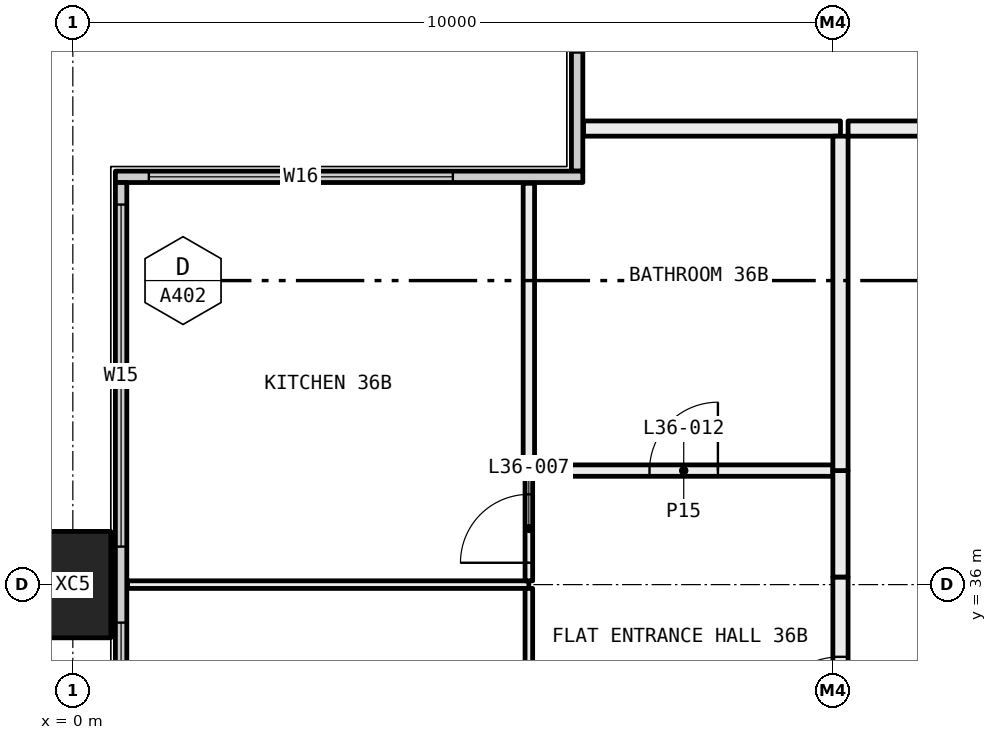
"""IFC4 building model, lengths in metres.
Left out: names, types, materials, properties, quantities, classifications, styles, units other than length and angle.
Written with IfcOpenShell. Run it as: python <this file> out.ifc"""

import sys

from ifc_helpers import new_model, si_unit, direction, frame, frame_2d, origin, origin_2d, place, context, subcontext, project, spatial, rectangle, hollow_rectangle, extrude, element, fill, save


model = new_model("IFC4")
c1 = context("Model", 3, precision=1e-05, world=origin(), true_north=direction((0.0, 1.0)))
c2 = subcontext(c1, "Body", "Model", "MODEL_VIEW")
j1 = project(units=[si_unit("LENGTHUNIT", "METRE"), si_unit("PLANEANGLEUNIT", "RADIAN")], contexts=[c1])
p1 = place(None, origin())
s1 = spatial("IfcSite", under=j1, at=p1, CompositionType="ELEMENT")
p2 = place(p1, origin())
s2 = spatial("IfcBuilding", under=s1, at=p2, CompositionType="ELEMENT")
p3 = place(p2, frame((0.0, 0.0, 138.0)))
s3 = spatial("IfcBuildingStorey", under=s2, at=p3, CompositionType="ELEMENT", Elevation=138.0)
p4 = place(p3, frame((0.0, 36.0, -0.4), z_axis=(0.0, 0.0, 1.0), x_axis=(0.0, 1.0, 0.0)))
e1 = element("IfcColumn", 1, at=p4, inside=s3, PredefinedType="COLUMN", context=c2, shape_type="SweptSolid", body=[
    extrude(hollow_rectangle(XDim=1.4, YDim=1.0, WallThickness=0.055, at=origin_2d()), origin(), (0.0, 0.0, 1.0), 3.45),
])
p5 = place(p3, frame((6.635, 41.44, 0.0), z_axis=(0.0, 0.0, 1.0), x_axis=(0.0, 1.0, 0.0)))
e2 = element("IfcWall", 2, at=p5, inside=s3, PredefinedType="ELEMENTEDWALL", context=c2, shape_type="SweptSolid", body=[
    extrude(rectangle(XDim=5.85, YDim=0.15, at=frame_2d((2.925, 0.0))), origin(), (0.0, 0.0, 1.0), 3.05),
])
p6 = place(p5, frame((1.56, 0.0, 0.45)))
e3 = element("IfcOpeningElement", 3, at=p6, cuts=e2, PredefinedType="OPENING", context=c2, shape_type="SweptSolid", body=[
    extrude(rectangle(XDim=4.0, YDim=2.55, at=frame_2d((2.0, 1.275))), frame((0.0, 0.085, 0.0), z_axis=(0.0, -1.0, 0.0), x_axis=(1.0, 0.0, 0.0)), (0.0, 0.0, 1.0), 0.17),
])
p7 = place(p3, frame((0.56, 41.365, 0.0), z_axis=(0.0, 0.0, 1.0), x_axis=(1.0, 0.0, 0.0)))
e4 = element("IfcWall", 4, at=p7, inside=s3, PredefinedType="ELEMENTEDWALL", context=c2, shape_type="SweptSolid", body=[
    extrude(rectangle(XDim=6.15, YDim=0.15, at=frame_2d((3.075, 0.0))), origin(), (0.0, 0.0, 1.0), 3.05),
])
p8 = place(p7, frame((0.44, 0.0, 0.45)))
e5 = element("IfcOpeningElement", 5, at=p8, cuts=e4, PredefinedType="OPENING", context=c2, shape_type="SweptSolid", body=[
    extrude(rectangle(XDim=4.0, YDim=2.55, at=frame_2d((2.0, 1.275))), frame((0.0, 0.085, 0.0), z_axis=(0.0, -1.0, 0.0), x_axis=(1.0, 0.0, 0.0)), (0.0, 0.0, 1.0), 0.17),
])
p9 = place(p3, frame((0.635, 18.71, 0.0), z_axis=(0.0, 0.0, 1.0), x_axis=(0.0, 1.0, 0.0)))
e6 = element("IfcWall", 6, at=p9, inside=s3, PredefinedType="ELEMENTEDWALL", context=c2, shape_type="SweptSolid", body=[
    extrude(rectangle(XDim=22.58, YDim=0.15, at=frame_2d((11.29, 0.0))), origin(), (0.0, 0.0, 1.0), 3.05),
])
p10 = place(p9, frame((0.29, 0.0, 0.45)))
e7 = element("IfcOpeningElement", 7, at=p10, cuts=e6, PredefinedType="OPENING", context=c2, shape_type="SweptSolid", body=[
    extrude(rectangle(XDim=4.5, YDim=2.55, at=frame_2d((2.25, 1.275))), frame((0.0, 0.085, 0.0), z_axis=(0.0, -1.0, 0.0), x_axis=(1.0, 0.0, 0.0)), (0.0, 0.0, 1.0), 0.17),
])
p11 = place(p9, frame((5.79, 0.0, 0.45)))
e8 = element("IfcOpeningElement", 8, at=p11, cuts=e6, PredefinedType="OPENING", context=c2, shape_type="SweptSolid", body=[
    extrude(rectangle(XDim=3.0, YDim=2.55, at=frame_2d((1.5, 1.275))), frame((0.0, 0.085, 0.0), z_axis=(0.0, -1.0, 0.0), x_axis=(1.0, 0.0, 0.0)), (0.0, 0.0, 1.0), 0.17),
])
p12 = place(p9, frame((14.79, 0.0, 0.45)))
e9 = element("IfcOpeningElement", 9, at=p12, cuts=e6, PredefinedType="OPENING", context=c2, shape_type="SweptSolid", body=[
    extrude(rectangle(XDim=2.0, YDim=2.55, at=frame_2d((1.0, 1.275))), frame((0.0, 0.085, 0.0), z_axis=(0.0, -1.0, 0.0), x_axis=(1.0, 0.0, 0.0)), (0.0, 0.0, 1.0), 0.17),
])
p13 = place(p9, frame((17.79, 0.0, 0.45)))
e10 = element("IfcOpeningElement", 10, at=p13, cuts=e6, PredefinedType="OPENING", context=c2, shape_type="SweptSolid", body=[
    extrude(rectangle(XDim=4.5, YDim=2.55, at=frame_2d((2.25, 1.275))), frame((0.0, 0.085, 0.0), z_axis=(0.0, -1.0, 0.0), x_axis=(1.0, 0.0, 0.0)), (0.0, 0.0, 1.0), 0.17),
])
p14 = place(p3, frame((6.0, 36.0, 0.0), z_axis=(0.0, 0.0, 1.0), x_axis=(-1.0, 0.0, 0.0)))
e11 = element("IfcWall", 11, at=p14, inside=s3, PredefinedType="PARTITIONING", context=c2, shape_type="SweptSolid", body=[
    extrude(rectangle(XDim=5.28, YDim=0.1, at=frame_2d((2.64, 0.0))), origin(), (0.0, 0.0, 1.0), 2.45),
])
p15 = place(p3, frame((6.0, 33.0, 0.0), z_axis=(0.0, 0.0, 1.0), x_axis=(0.0, 1.0, 0.0)))
e12 = element("IfcWall", 12, at=p15, inside=s3, PredefinedType="PARTITIONING", context=c2, shape_type="SweptSolid", body=[
    extrude(rectangle(XDim=2.95, YDim=0.1, at=frame_2d((1.475, 0.0))), origin(), (0.0, 0.0, 1.0), 2.45),
])
p16 = place(p15, frame((1.025, 0.0, 0.0)))
e13 = element("IfcOpeningElement", 13, at=p16, cuts=e12, PredefinedType="OPENING", context=c2, shape_type="SweptSolid", body=[
    extrude(rectangle(XDim=0.9, YDim=2.1, at=frame_2d((0.45, 1.05))), frame((0.0, 0.06, 0.0), z_axis=(0.0, -1.0, 0.0), x_axis=(1.0, 0.0, 0.0)), (0.0, 0.0, 1.0), 0.12),
])
p17 = place(p3, frame((6.0, 36.05, 0.0), z_axis=(0.0, 0.0, 1.0), x_axis=(0.0, 1.0, 0.0)))
e14 = element("IfcWall", 14, at=p17, inside=s3, PredefinedType="PARTITIONING", context=c2, shape_type="SweptSolid", body=[
    extrude(rectangle(XDim=1.375, YDim=0.1, at=frame_2d((0.688, 0.0))), origin(), (0.0, 0.0, 1.0), 2.45),
])
p18 = place(p17, frame((0.238, 0.0, 0.0)))
e15 = element("IfcOpeningElement", 15, at=p18, cuts=e14, PredefinedType="OPENING", context=c2, shape_type="SweptSolid", body=[
    extrude(rectangle(XDim=0.9, YDim=2.1, at=frame_2d((0.45, 1.05))), frame((0.0, 0.06, 0.0), z_axis=(0.0, -1.0, 0.0), x_axis=(1.0, 0.0, 0.0)), (0.0, 0.0, 1.0), 0.12),
])
p19 = place(p3, frame((6.0, 37.5, 0.0), z_axis=(0.0, 0.0, 1.0), x_axis=(0.0, 1.0, 0.0)))
e16 = element("IfcWall", 16, at=p19, inside=s3, PredefinedType="PARTITIONING", context=c2, shape_type="SweptSolid", body=[
    extrude(rectangle(XDim=3.78, YDim=0.15, at=frame_2d((1.89, 0.0))), origin(), (0.0, 0.0, 1.0), 3.05),
])
p20 = place(p3, frame((10.0, 37.5, 0.0), z_axis=(0.0, 0.0, 1.0), x_axis=(-1.0, 0.0, 0.0)))
e17 = element("IfcWall", 17, at=p20, inside=s3, PredefinedType="PARTITIONING", context=c2, shape_type="SweptSolid", body=[
    extrude(rectangle(XDim=3.925, YDim=0.15, at=frame_2d((1.962, 0.0))), origin(), (0.0, 0.0, 1.0), 3.05),
])
p21 = place(p20, frame((1.512, 0.0, 0.0)))
e18 = element("IfcOpeningElement", 18, at=p21, cuts=e17, PredefinedType="OPENING", context=c2, shape_type="SweptSolid", body=[
    extrude(rectangle(XDim=0.9, YDim=2.1, at=frame_2d((0.45, 1.05))), frame((0.0, 0.085, 0.0), z_axis=(0.0, -1.0, 0.0), x_axis=(1.0, 0.0, 0.0)), (0.0, 0.0, 1.0), 0.17),
])
p22 = place(p3, frame((10.1, 33.0, 0.0), z_axis=(0.0, 0.0, 1.0), x_axis=(0.0, 1.0, 0.0)))
e19 = element("IfcWall", 19, at=p22, inside=s3, PredefinedType="PARTITIONING", context=c2, shape_type="SweptSolid", body=[
    extrude(rectangle(XDim=3.1, YDim=0.2, at=frame_2d((1.55, 0.0))), origin(), (0.0, 0.0, 1.0), 2.45),
])
p23 = place(p22, frame((1.05, 0.0, 0.0)))
e20 = element("IfcOpeningElement", 20, at=p23, cuts=e19, PredefinedType="OPENING", context=c2, shape_type="SweptSolid", body=[
    extrude(rectangle(XDim=1.0, YDim=2.1, at=frame_2d((0.5, 1.05))), frame((0.0, 0.11, 0.0), z_axis=(0.0, -1.0, 0.0), x_axis=(1.0, 0.0, 0.0)), (0.0, 0.0, 1.0), 0.22),
])
p24 = place(p3, frame((10.1, 36.1, 0.0), z_axis=(0.0, 0.0, 1.0), x_axis=(0.0, 1.0, 0.0)))
e21 = element("IfcWall", 21, at=p24, inside=s3, PredefinedType="PARTITIONING", context=c2, shape_type="SweptSolid", body=[
    extrude(rectangle(XDim=1.4, YDim=0.2, at=frame_2d((0.7, 0.0))), origin(), (0.0, 0.0, 1.0), 3.05),
])
p25 = place(p3, frame((10.1, 42.0, 0.0), z_axis=(0.0, 0.0, 1.0), x_axis=(-1.0, 0.0, 0.0)))
e22 = element("IfcWall", 22, at=p25, inside=s3, PredefinedType="PARTITIONING", context=c2, shape_type="SweptSolid", body=[
    extrude(rectangle(XDim=3.38, YDim=0.2, at=frame_2d((1.69, 0.0))), origin(), (0.0, 0.0, 1.0), 3.05),
])
p26 = place(p3, frame((10.1, 37.5, 0.0), z_axis=(0.0, 0.0, 1.0), x_axis=(0.0, 1.0, 0.0)))
e23 = element("IfcWall", 23, at=p26, inside=s3, PredefinedType="PARTITIONING", context=c2, shape_type="SweptSolid", body=[
    extrude(rectangle(XDim=4.4, YDim=0.2, at=frame_2d((2.2, 0.0))), origin(), (0.0, 0.0, 1.0), 3.05),
])
p27 = place(p3, frame((10.2, 42.0, 0.0), z_axis=(0.0, 0.0, 1.0), x_axis=(1.0, 0.0, 0.0)))
e24 = element("IfcWall", 24, at=p27, inside=s3, PredefinedType="PARTITIONING", context=c2, shape_type="SweptSolid", body=[
    extrude(rectangle(XDim=1.8, YDim=0.2, at=frame_2d((0.9, 0.0))), origin(), (0.0, 0.0, 1.0), 3.05),
])
p28 = place(p8, origin())
e25 = element("IfcWindow", 25, at=p28, inside=s3, PartitioningType="SINGLE_PANEL", PredefinedType="WINDOW", context=c2, shape_type="SweptSolid", body=[
    extrude(rectangle(XDim=4.0, YDim=2.55, at=frame_2d((2.0, 1.275))), frame((0.0, 0.03, 0.0), z_axis=(0.0, -1.0, 0.0), x_axis=(1.0, 0.0, 0.0)), (0.0, 0.0, 1.0), 0.06),
])
fill(e5, e25)
p29 = place(p12, origin())
e26 = element("IfcWindow", 26, at=p29, inside=s3, PartitioningType="SINGLE_PANEL", PredefinedType="WINDOW", context=c2, shape_type="SweptSolid", body=[
    extrude(rectangle(XDim=2.0, YDim=2.55, at=frame_2d((1.0, 1.275))), frame((0.0, 0.03, 0.0), z_axis=(0.0, -1.0, 0.0), x_axis=(1.0, 0.0, 0.0)), (0.0, 0.0, 1.0), 0.06),
])
fill(e9, e26)
p30 = place(p13, origin())
e27 = element("IfcWindow", 27, at=p30, inside=s3, PartitioningType="SINGLE_PANEL", PredefinedType="WINDOW", context=c2, shape_type="SweptSolid", body=[
    extrude(rectangle(XDim=4.5, YDim=2.55, at=frame_2d((2.25, 1.275))), frame((0.0, 0.03, 0.0), z_axis=(0.0, -1.0, 0.0), x_axis=(1.0, 0.0, 0.0)), (0.0, 0.0, 1.0), 0.06),
])
fill(e10, e27)
p31 = place(p23, origin())
e28 = element("IfcDoor", 28, at=p31, inside=s3, OperationType="SINGLE_SWING_RIGHT", PredefinedType="DOOR", context=c2, shape_type="SweptSolid", body=[
    extrude(rectangle(XDim=1.0, YDim=2.1, at=frame_2d((0.5, 1.05))), frame((0.0, 0.025, 0.0), z_axis=(0.0, -1.0, 0.0), x_axis=(1.0, 0.0, 0.0)), (0.0, 0.0, 1.0), 0.05),
])
fill(e20, e28)
p32 = place(p18, origin())
e29 = element("IfcDoor", 29, at=p32, inside=s3, OperationType="SINGLE_SWING_RIGHT", PredefinedType="DOOR", context=c2, shape_type="SweptSolid", body=[
    extrude(rectangle(XDim=0.9, YDim=2.1, at=frame_2d((0.45, 1.05))), frame((0.0, 0.025, 0.0), z_axis=(0.0, -1.0, 0.0), x_axis=(1.0, 0.0, 0.0)), (0.0, 0.0, 1.0), 0.05),
])
fill(e15, e29)
p33 = place(p21, frame((0.9, 0.0, 0.0), x_axis=(-1.0, 0.0, 0.0)))
e30 = element("IfcDoor", 30, at=p33, inside=s3, OperationType="SINGLE_SWING_LEFT", PredefinedType="DOOR", context=c2, shape_type="SweptSolid", body=[
    extrude(rectangle(XDim=0.9, YDim=2.1, at=frame_2d((0.45, 1.05))), frame((0.0, 0.025, 0.0), z_axis=(0.0, -1.0, 0.0), x_axis=(1.0, 0.0, 0.0)), (0.0, 0.0, 1.0), 0.05),
])
fill(e18, e30)
save(model, sys.argv[1])
